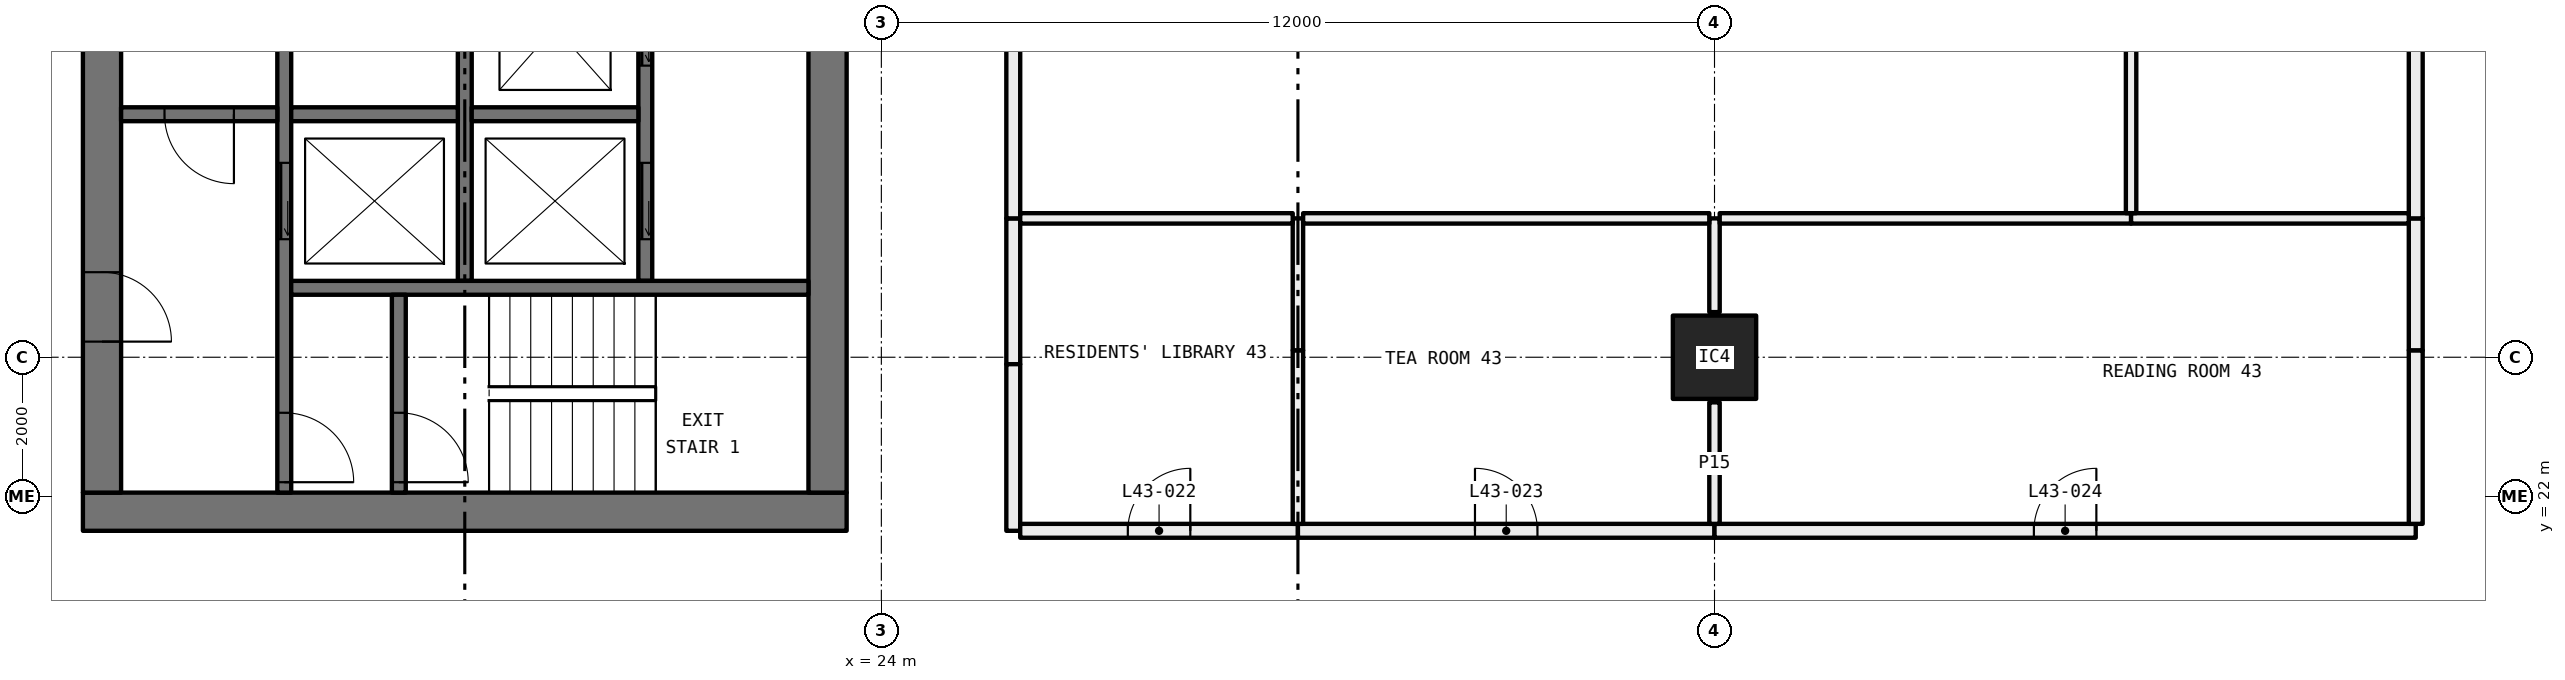
"""IFC4 building model, lengths in metres.
Left out: names, types, materials, properties, quantities, classifications, styles, units other than length and angle.
Written with IfcOpenShell. Run it as: python <this file> out.ifc"""

import sys

from ifc_helpers import new_model, si_unit, direction, frame, frame_2d, origin, origin_2d, place, context, subcontext, project, spatial, rectangle, hollow_rectangle, extrude, element, fill, save


model = new_model("IFC4")
c1 = context("Model", 3, precision=1e-05, world=origin(), true_north=direction((0.0, 1.0)))
c2 = subcontext(c1, "Body", "Model", "MODEL_VIEW")
j1 = project(units=[si_unit("LENGTHUNIT", "METRE"), si_unit("PLANEANGLEUNIT", "RADIAN")], contexts=[c1])
p1 = place(None, origin())
s1 = spatial("IfcSite", under=j1, at=p1, CompositionType="ELEMENT")
p2 = place(p1, origin())
s2 = spatial("IfcBuilding", under=s1, at=p2, CompositionType="ELEMENT")
p3 = place(p2, frame((0.0, 0.0, 165.15)))
s3 = spatial("IfcBuildingStorey", under=s2, at=p3, CompositionType="ELEMENT", Elevation=165.15)
p4 = place(p3, frame((36.0, 24.0, 0.0), z_axis=(0.0, 0.0, 1.0), x_axis=(1.0, 0.0, 0.0)))
e1 = element("IfcColumn", 1, at=p4, inside=s3, PredefinedType="COLUMN", context=c2, shape_type="SweptSolid", body=[
    extrude(hollow_rectangle(XDim=1.2, YDim=1.2, WallThickness=0.05, at=origin_2d()), origin(), (0.0, 0.0, 1.0), 3.05),
])
p5 = place(p3, frame((25.9, 26.0, 0.0), z_axis=(0.0, 0.0, 1.0), x_axis=(0.0, -1.0, 0.0)))
e2 = element("IfcWall", 2, at=p5, inside=s3, PredefinedType="PARTITIONING", context=c2, shape_type="SweptSolid", body=[
    extrude(rectangle(XDim=2.1, YDim=0.2, at=frame_2d((1.05, 0.0))), origin(), (0.0, 0.0, 1.0), 2.45),
])
p6 = place(p3, frame((25.9, 23.9, 0.0), z_axis=(0.0, 0.0, 1.0), x_axis=(0.0, -1.0, 0.0)))
e3 = element("IfcWall", 3, at=p6, inside=s3, PredefinedType="PARTITIONING", context=c2, shape_type="SweptSolid", body=[
    extrude(rectangle(XDim=2.4, YDim=0.2, at=frame_2d((1.2, 0.0))), origin(), (0.0, 0.0, 1.0), 3.05),
])
p7 = place(p3, frame((26.0, 21.5, 0.0), z_axis=(0.0, 0.0, 1.0), x_axis=(1.0, 0.0, 0.0)))
e4 = element("IfcWall", 4, at=p7, inside=s3, PredefinedType="PARTITIONING", context=c2, shape_type="SweptSolid", body=[
    extrude(rectangle(XDim=4.0, YDim=0.2, at=frame_2d((2.0, 0.0))), origin(), (0.0, 0.0, 1.0), 3.05),
])
p8 = place(p7, frame((1.55, 0.0, 0.0)))
e5 = element("IfcOpeningElement", 5, at=p8, cuts=e4, PredefinedType="OPENING", context=c2, shape_type="SweptSolid", body=[
    extrude(rectangle(XDim=0.9, YDim=2.1, at=frame_2d((0.45, 1.05))), frame((0.0, 0.11, 0.0), z_axis=(0.0, -1.0, 0.0), x_axis=(1.0, 0.0, 0.0)), (0.0, 0.0, 1.0), 0.22),
])
p9 = place(p3, frame((30.0, 21.5, 0.0), z_axis=(0.0, 0.0, 1.0), x_axis=(1.0, 0.0, 0.0)))
e6 = element("IfcWall", 6, at=p9, inside=s3, PredefinedType="PARTITIONING", context=c2, shape_type="SweptSolid", body=[
    extrude(rectangle(XDim=6.0, YDim=0.2, at=frame_2d((3.0, 0.0))), origin(), (0.0, 0.0, 1.0), 2.45),
])
p10 = place(p9, frame((2.55, 0.0, 0.0)))
e7 = element("IfcOpeningElement", 7, at=p10, cuts=e6, PredefinedType="OPENING", context=c2, shape_type="SweptSolid", body=[
    extrude(rectangle(XDim=0.9, YDim=2.1, at=frame_2d((0.45, 1.05))), frame((0.0, 0.11, 0.0), z_axis=(0.0, -1.0, 0.0), x_axis=(1.0, 0.0, 0.0)), (0.0, 0.0, 1.0), 0.22),
])
p11 = place(p3, frame((36.0, 21.5, 0.0), z_axis=(0.0, 0.0, 1.0), x_axis=(1.0, 0.0, 0.0)))
e8 = element("IfcWall", 8, at=p11, inside=s3, PredefinedType="PARTITIONING", context=c2, shape_type="SweptSolid", body=[
    extrude(rectangle(XDim=10.1, YDim=0.2, at=frame_2d((5.05, 0.0))), origin(), (0.0, 0.0, 1.0), 2.45),
])
p12 = place(p11, frame((4.6, 0.0, 0.0)))
e9 = element("IfcOpeningElement", 9, at=p12, cuts=e8, PredefinedType="OPENING", context=c2, shape_type="SweptSolid", body=[
    extrude(rectangle(XDim=0.9, YDim=2.1, at=frame_2d((0.45, 1.05))), frame((0.0, 0.11, 0.0), z_axis=(0.0, -1.0, 0.0), x_axis=(1.0, 0.0, 0.0)), (0.0, 0.0, 1.0), 0.22),
])
p13 = place(p3, frame((46.1, 21.6, 0.0), z_axis=(0.0, 0.0, 1.0), x_axis=(0.0, 1.0, 0.0)))
e10 = element("IfcWall", 10, at=p13, inside=s3, PredefinedType="PARTITIONING", context=c2, shape_type="SweptSolid", body=[
    extrude(rectangle(XDim=2.5, YDim=0.2, at=frame_2d((1.25, 0.0))), origin(), (0.0, 0.0, 1.0), 2.45),
])
p14 = place(p3, frame((46.1, 24.1, 0.0), z_axis=(0.0, 0.0, 1.0), x_axis=(0.0, 1.0, 0.0)))
e11 = element("IfcWall", 11, at=p14, inside=s3, PredefinedType="PARTITIONING", context=c2, shape_type="SweptSolid", body=[
    extrude(rectangle(XDim=1.9, YDim=0.2, at=frame_2d((0.95, 0.0))), origin(), (0.0, 0.0, 1.0), 3.05),
])
p15 = place(p3, frame((25.9, 35.9, 0.0), z_axis=(0.0, 0.0, 1.0), x_axis=(0.0, -1.0, 0.0)))
e12 = element("IfcWall", 12, at=p15, inside=s3, PredefinedType="PARTITIONING", context=c2, shape_type="SweptSolid", body=[
    extrude(rectangle(XDim=9.9, YDim=0.2, at=frame_2d((4.95, 0.0))), origin(), (0.0, 0.0, 1.0), 3.05),
])
p16 = place(p3, frame((46.1, 26.0, 0.0), z_axis=(0.0, 0.0, 1.0), x_axis=(0.0, 1.0, 0.0)))
e13 = element("IfcWall", 13, at=p16, inside=s3, PredefinedType="PARTITIONING", context=c2, shape_type="SweptSolid", body=[
    extrude(rectangle(XDim=10.1, YDim=0.2, at=frame_2d((5.05, 0.0))), origin(), (0.0, 0.0, 1.0), 2.45),
])
p17 = place(p16, frame((4.6, 0.0, 0.0)))
e14 = element("IfcOpeningElement", 14, at=p17, cuts=e13, PredefinedType="OPENING", context=c2, shape_type="SweptSolid", body=[
    extrude(rectangle(XDim=0.9, YDim=2.1, at=frame_2d((0.45, 1.05))), frame((0.0, 0.11, 0.0), z_axis=(0.0, -1.0, 0.0), x_axis=(1.0, 0.0, 0.0)), (0.0, 0.0, 1.0), 0.22),
])
p18 = place(p3, frame((30.0, 21.6, 0.0), z_axis=(0.0, 0.0, 1.0), x_axis=(0.0, 1.0, 0.0)))
e15 = element("IfcWall", 15, at=p18, inside=s3, PredefinedType="PARTITIONING", context=c2, shape_type="SweptSolid", body=[
    extrude(rectangle(XDim=2.5, YDim=0.15, at=frame_2d((1.25, 0.0))), origin(), (0.0, 0.0, 1.0), 2.45),
])
p19 = place(p3, frame((30.0, 24.1, 0.0), z_axis=(0.0, 0.0, 1.0), x_axis=(0.0, 1.0, 0.0)))
e16 = element("IfcWall", 16, at=p19, inside=s3, PredefinedType="PARTITIONING", context=c2, shape_type="SweptSolid", body=[
    extrude(rectangle(XDim=1.9, YDim=0.15, at=frame_2d((0.95, 0.0))), origin(), (0.0, 0.0, 1.0), 3.05),
])
p20 = place(p3, frame((29.925, 26.0, 0.0), z_axis=(0.0, 0.0, 1.0), x_axis=(-1.0, 0.0, 0.0)))
e17 = element("IfcWall", 17, at=p20, inside=s3, PredefinedType="PARTITIONING", context=c2, shape_type="SweptSolid", body=[
    extrude(rectangle(XDim=3.925, YDim=0.15, at=frame_2d((1.962, 0.0))), origin(), (0.0, 0.0, 1.0), 3.05),
])
p21 = place(p3, frame((36.0, 21.6, 0.0), z_axis=(0.0, 0.0, 1.0), x_axis=(0.0, 1.0, 0.0)))
e18 = element("IfcWall", 18, at=p21, inside=s3, PredefinedType="PARTITIONING", context=c2, shape_type="SweptSolid", body=[
    extrude(rectangle(XDim=1.75, YDim=0.15, at=frame_2d((0.875, 0.0))), origin(), (0.0, 0.0, 1.0), 2.45),
])
p22 = place(p3, frame((36.0, 24.65, 0.0), z_axis=(0.0, 0.0, 1.0), x_axis=(0.0, 1.0, 0.0)))
e19 = element("IfcWall", 19, at=p22, inside=s3, PredefinedType="PARTITIONING", context=c2, shape_type="SweptSolid", body=[
    extrude(rectangle(XDim=1.35, YDim=0.15, at=frame_2d((0.675, 0.0))), origin(), (0.0, 0.0, 1.0), 2.45),
])
p23 = place(p3, frame((35.925, 26.0, 0.0), z_axis=(0.0, 0.0, 1.0), x_axis=(-1.0, 0.0, 0.0)))
e20 = element("IfcWall", 20, at=p23, inside=s3, PredefinedType="PARTITIONING", context=c2, shape_type="SweptSolid", body=[
    extrude(rectangle(XDim=5.85, YDim=0.15, at=frame_2d((2.925, 0.0))), origin(), (0.0, 0.0, 1.0), 2.45),
])
p24 = place(p3, frame((42.0, 26.0, 0.0), z_axis=(0.0, 0.0, 1.0), x_axis=(-1.0, 0.0, 0.0)))
e21 = element("IfcWall", 21, at=p24, inside=s3, PredefinedType="PARTITIONING", context=c2, shape_type="SweptSolid", body=[
    extrude(rectangle(XDim=5.925, YDim=0.15, at=frame_2d((2.962, 0.0))), origin(), (0.0, 0.0, 1.0), 2.45),
])
p25 = place(p3, frame((46.0, 26.0, 0.0), z_axis=(0.0, 0.0, 1.0), x_axis=(-1.0, 0.0, 0.0)))
e22 = element("IfcWall", 22, at=p25, inside=s3, PredefinedType="PARTITIONING", context=c2, shape_type="SweptSolid", body=[
    extrude(rectangle(XDim=4.0, YDim=0.15, at=frame_2d((2.0, 0.0))), origin(), (0.0, 0.0, 1.0), 3.05),
])
p26 = place(p3, frame((42.0, 26.075, 0.0), z_axis=(0.0, 0.0, 1.0), x_axis=(0.0, 1.0, 0.0)))
e23 = element("IfcWall", 23, at=p26, inside=s3, PredefinedType="PARTITIONING", context=c2, shape_type="SweptSolid", body=[
    extrude(rectangle(XDim=10.025, YDim=0.15, at=frame_2d((5.013, 0.0))), origin(), (0.0, 0.0, 1.0), 2.45),
])
p27 = place(p3, frame((12.5, 21.775, 0.0), z_axis=(0.0, 0.0, 1.0), x_axis=(1.0, 0.0, 0.0)))
e24 = element("IfcWall", 24, at=p27, inside=s3, PredefinedType="SHEAR", context=c2, shape_type="SweptSolid", body=[
    extrude(rectangle(XDim=11.0, YDim=0.55, at=frame_2d((5.5, 0.0))), origin(), (0.0, 0.0, 1.0), 3.05),
])
p28 = place(p3, frame((12.775, 22.05, 0.0), z_axis=(0.0, 0.0, 1.0), x_axis=(0.0, 1.0, 0.0)))
e25 = element("IfcWall", 25, at=p28, inside=s3, PredefinedType="SHEAR", context=c2, shape_type="SweptSolid", body=[
    extrude(rectangle(XDim=15.9, YDim=0.55, at=frame_2d((7.95, 0.0))), origin(), (0.0, 0.0, 1.0), 3.05),
])
p29 = place(p28, frame((8.4, 0.0, 0.0)))
e26 = element("IfcOpeningElement", 26, at=p29, cuts=e25, PredefinedType="OPENING", context=c2, shape_type="SweptSolid", body=[
    extrude(rectangle(XDim=1.6, YDim=2.1, at=frame_2d((0.8, 1.05))), frame((0.0, 0.285, 0.0), z_axis=(0.0, -1.0, 0.0), x_axis=(1.0, 0.0, 0.0)), (0.0, 0.0, 1.0), 0.57),
])
p30 = place(p28, frame((2.175, 0.0, 0.0)))
e27 = element("IfcOpeningElement", 27, at=p30, cuts=e25, PredefinedType="OPENING", context=c2, shape_type="SweptSolid", body=[
    extrude(rectangle(XDim=1.0, YDim=2.1, at=frame_2d((0.5, 1.05))), frame((0.0, 0.285, 0.0), z_axis=(0.0, -1.0, 0.0), x_axis=(1.0, 0.0, 0.0)), (0.0, 0.0, 1.0), 0.57),
])
p31 = place(p3, frame((23.225, 22.05, 0.0), z_axis=(0.0, 0.0, 1.0), x_axis=(0.0, 1.0, 0.0)))
e28 = element("IfcWall", 28, at=p31, inside=s3, PredefinedType="SHEAR", context=c2, shape_type="SweptSolid", body=[
    extrude(rectangle(XDim=15.9, YDim=0.55, at=frame_2d((7.95, 0.0))), origin(), (0.0, 0.0, 1.0), 3.05),
])
p32 = place(p31, frame((7.15, 0.0, 0.0)))
e29 = element("IfcOpeningElement", 29, at=p32, cuts=e28, PredefinedType="OPENING", context=c2, shape_type="SweptSolid", body=[
    extrude(rectangle(XDim=1.6, YDim=2.1, at=frame_2d((0.8, 1.05))), frame((0.0, 0.285, 0.0), z_axis=(0.0, -1.0, 0.0), x_axis=(1.0, 0.0, 0.0)), (0.0, 0.0, 1.0), 0.57),
])
p33 = place(p3, frame((15.4, 22.05, 0.0), z_axis=(0.0, 0.0, 1.0), x_axis=(0.0, 1.0, 0.0)))
e30 = element("IfcWall", 30, at=p33, inside=s3, PredefinedType="SOLIDWALL", context=c2, shape_type="SweptSolid", body=[
    extrude(rectangle(XDim=12.85, YDim=0.2, at=frame_2d((6.425, 0.0))), origin(), (0.0, 0.0, 1.0), 3.05),
])
p34 = place(p33, frame((3.65, 0.0, 0.0)))
e31 = element("IfcOpeningElement", 31, at=p34, cuts=e30, PredefinedType="OPENING", context=c2, shape_type="SweptSolid", body=[
    extrude(rectangle(XDim=1.1, YDim=2.1, at=frame_2d((0.55, 1.05))), frame((0.0, 0.11, 0.0), z_axis=(0.0, -1.0, 0.0), x_axis=(1.0, 0.0, 0.0)), (0.0, 0.0, 1.0), 0.22),
])
p35 = place(p33, frame((0.15, 0.0, 0.0)))
e32 = element("IfcOpeningElement", 32, at=p35, cuts=e30, PredefinedType="OPENING", context=c2, shape_type="SweptSolid", body=[
    extrude(rectangle(XDim=1.0, YDim=2.1, at=frame_2d((0.5, 1.05))), frame((0.0, 0.11, 0.0), z_axis=(0.0, -1.0, 0.0), x_axis=(1.0, 0.0, 0.0)), (0.0, 0.0, 1.0), 0.22),
])
p36 = place(p33, frame((8.75, 0.0, 0.0)))
e33 = element("IfcOpeningElement", 33, at=p36, cuts=e30, PredefinedType="OPENING", context=c2, shape_type="SweptSolid", body=[
    extrude(rectangle(XDim=0.9, YDim=2.1, at=frame_2d((0.45, 1.05))), frame((0.0, 0.11, 0.0), z_axis=(0.0, -1.0, 0.0), x_axis=(1.0, 0.0, 0.0)), (0.0, 0.0, 1.0), 0.22),
])
p37 = place(p3, frame((20.6, 25.1, 0.0), z_axis=(0.0, 0.0, 1.0), x_axis=(0.0, 1.0, 0.0)))
e34 = element("IfcWall", 34, at=p37, inside=s3, PredefinedType="SOLIDWALL", context=c2, shape_type="SweptSolid", body=[
    extrude(rectangle(XDim=12.85, YDim=0.2, at=frame_2d((6.425, 0.0))), origin(), (0.0, 0.0, 1.0), 3.05),
])
p38 = place(p37, frame((0.6, 0.0, 0.0)))
e35 = element("IfcOpeningElement", 35, at=p38, cuts=e34, PredefinedType="OPENING", context=c2, shape_type="SweptSolid", body=[
    extrude(rectangle(XDim=1.1, YDim=2.1, at=frame_2d((0.55, 1.05))), frame((0.0, 0.11, 0.0), z_axis=(0.0, -1.0, 0.0), x_axis=(1.0, 0.0, 0.0)), (0.0, 0.0, 1.0), 0.22),
])
p39 = place(p37, frame((3.1, 0.0, 0.0)))
e36 = element("IfcOpeningElement", 36, at=p39, cuts=e34, PredefinedType="OPENING", context=c2, shape_type="SweptSolid", body=[
    extrude(rectangle(XDim=1.1, YDim=2.1, at=frame_2d((0.55, 1.05))), frame((0.0, 0.11, 0.0), z_axis=(0.0, -1.0, 0.0), x_axis=(1.0, 0.0, 0.0)), (0.0, 0.0, 1.0), 0.22),
])
p40 = place(p37, frame((5.6, 0.0, 0.0)))
e37 = element("IfcOpeningElement", 37, at=p40, cuts=e34, PredefinedType="OPENING", context=c2, shape_type="SweptSolid", body=[
    extrude(rectangle(XDim=1.1, YDim=2.1, at=frame_2d((0.55, 1.05))), frame((0.0, 0.11, 0.0), z_axis=(0.0, -1.0, 0.0), x_axis=(1.0, 0.0, 0.0)), (0.0, 0.0, 1.0), 0.22),
])
p41 = place(p37, frame((8.1, 0.0, 0.0)))
e38 = element("IfcOpeningElement", 38, at=p41, cuts=e34, PredefinedType="OPENING", context=c2, shape_type="SweptSolid", body=[
    extrude(rectangle(XDim=1.1, YDim=2.1, at=frame_2d((0.55, 1.05))), frame((0.0, 0.11, 0.0), z_axis=(0.0, -1.0, 0.0), x_axis=(1.0, 0.0, 0.0)), (0.0, 0.0, 1.0), 0.22),
])
p42 = place(p37, frame((10.925, 0.0, 0.0)))
e39 = element("IfcOpeningElement", 39, at=p42, cuts=e34, PredefinedType="OPENING", context=c2, shape_type="SweptSolid", body=[
    extrude(rectangle(XDim=1.0, YDim=2.1, at=frame_2d((0.5, 1.05))), frame((0.0, 0.11, 0.0), z_axis=(0.0, -1.0, 0.0), x_axis=(1.0, 0.0, 0.0)), (0.0, 0.0, 1.0), 0.22),
])
p43 = place(p3, frame((18.0, 25.1, 0.0), z_axis=(0.0, 0.0, 1.0), x_axis=(0.0, 1.0, 0.0)))
e40 = element("IfcWall", 40, at=p43, inside=s3, PredefinedType="SOLIDWALL", context=c2, shape_type="SweptSolid", body=[
    extrude(rectangle(XDim=9.8, YDim=0.2, at=frame_2d((4.9, 0.0))), origin(), (0.0, 0.0, 1.0), 3.05),
])
p44 = place(p3, frame((15.5, 25.0, 0.0), z_axis=(0.0, 0.0, 1.0), x_axis=(1.0, 0.0, 0.0)))
e41 = element("IfcWall", 41, at=p44, inside=s3, PredefinedType="SOLIDWALL", context=c2, shape_type="SweptSolid", body=[
    extrude(rectangle(XDim=7.45, YDim=0.2, at=frame_2d((3.725, 0.0))), origin(), (0.0, 0.0, 1.0), 3.05),
])
p45 = place(p3, frame((13.05, 27.5, 0.0), z_axis=(0.0, 0.0, 1.0), x_axis=(1.0, 0.0, 0.0)))
e42 = element("IfcWall", 42, at=p45, inside=s3, PredefinedType="SOLIDWALL", context=c2, shape_type="SweptSolid", body=[
    extrude(rectangle(XDim=2.25, YDim=0.2, at=frame_2d((1.125, 0.0))), origin(), (0.0, 0.0, 1.0), 3.05),
])
p46 = place(p45, frame((0.625, 0.0, 0.0)))
e43 = element("IfcOpeningElement", 43, at=p46, cuts=e42, PredefinedType="OPENING", context=c2, shape_type="SweptSolid", body=[
    extrude(rectangle(XDim=1.0, YDim=2.1, at=frame_2d((0.5, 1.05))), frame((0.0, 0.11, 0.0), z_axis=(0.0, -1.0, 0.0), x_axis=(1.0, 0.0, 0.0)), (0.0, 0.0, 1.0), 0.22),
])
p47 = place(p3, frame((17.05, 22.05, 0.0), z_axis=(0.0, 0.0, 1.0), x_axis=(0.0, 1.0, 0.0)))
e44 = element("IfcWall", 44, at=p47, inside=s3, PredefinedType="SOLIDWALL", context=c2, shape_type="SweptSolid", body=[
    extrude(rectangle(XDim=2.85, YDim=0.2, at=frame_2d((1.425, 0.0))), origin(), (0.0, 0.0, 1.0), 3.05),
])
p48 = place(p47, frame((0.15, 0.0, 0.0)))
e45 = element("IfcOpeningElement", 45, at=p48, cuts=e44, PredefinedType="OPENING", context=c2, shape_type="SweptSolid", body=[
    extrude(rectangle(XDim=1.0, YDim=2.1, at=frame_2d((0.5, 1.05))), frame((0.0, 0.11, 0.0), z_axis=(0.0, -1.0, 0.0), x_axis=(1.0, 0.0, 0.0)), (0.0, 0.0, 1.0), 0.22),
])
for number, where, z_axis, x_axis in (
    (46, (15.5, 27.5, 0.0), (0.0, 0.0, 1.0), (1.0, 0.0, 0.0)),
    (47, (18.1, 27.5, 0.0), (0.0, 0.0, 1.0), (1.0, 0.0, 0.0)),
):
    element("IfcWall", number, at=place(p3, frame(where, z_axis=z_axis, x_axis=x_axis)), inside=s3, PredefinedType="SOLIDWALL", context=c2, shape_type="SweptSolid", body=[
        extrude(rectangle(XDim=2.4, YDim=0.2, at=frame_2d((1.2, 0.0))), origin(), (0.0, 0.0, 1.0), 3.05),
    ])
p49 = place(p8, origin())
e48 = element("IfcDoor", 48, at=p49, inside=s3, OperationType="SINGLE_SWING_LEFT", PredefinedType="DOOR", context=c2, shape_type="SweptSolid", body=[
    extrude(rectangle(XDim=0.9, YDim=2.1, at=frame_2d((0.45, 1.05))), frame((0.0, 0.025, 0.0), z_axis=(0.0, -1.0, 0.0), x_axis=(1.0, 0.0, 0.0)), (0.0, 0.0, 1.0), 0.05),
])
fill(e5, e48)
p50 = place(p10, origin())
e49 = element("IfcDoor", 49, at=p50, inside=s3, OperationType="SINGLE_SWING_RIGHT", PredefinedType="DOOR", context=c2, shape_type="SweptSolid", body=[
    extrude(rectangle(XDim=0.9, YDim=2.1, at=frame_2d((0.45, 1.05))), frame((0.0, 0.025, 0.0), z_axis=(0.0, -1.0, 0.0), x_axis=(1.0, 0.0, 0.0)), (0.0, 0.0, 1.0), 0.05),
])
fill(e7, e49)
p51 = place(p12, origin())
e50 = element("IfcDoor", 50, at=p51, inside=s3, OperationType="SINGLE_SWING_LEFT", PredefinedType="DOOR", context=c2, shape_type="SweptSolid", body=[
    extrude(rectangle(XDim=0.9, YDim=2.1, at=frame_2d((0.45, 1.05))), frame((0.0, 0.025, 0.0), z_axis=(0.0, -1.0, 0.0), x_axis=(1.0, 0.0, 0.0)), (0.0, 0.0, 1.0), 0.05),
])
fill(e9, e50)
p52 = place(p38, origin())
e51 = element("IfcDoor", 51, at=p52, inside=s3, OperationType="SLIDING_TO_LEFT", PredefinedType="DOOR", context=c2, shape_type="SweptSolid", body=[
    extrude(rectangle(XDim=1.1, YDim=2.1, at=frame_2d((0.55, 1.05))), frame((0.0, 0.025, 0.0), z_axis=(0.0, -1.0, 0.0), x_axis=(1.0, 0.0, 0.0)), (0.0, 0.0, 1.0), 0.05),
])
fill(e35, e51)
p53 = place(p39, origin())
e52 = element("IfcDoor", 52, at=p53, inside=s3, OperationType="SLIDING_TO_LEFT", PredefinedType="DOOR", context=c2, shape_type="SweptSolid", body=[
    extrude(rectangle(XDim=1.1, YDim=2.1, at=frame_2d((0.55, 1.05))), frame((0.0, 0.025, 0.0), z_axis=(0.0, -1.0, 0.0), x_axis=(1.0, 0.0, 0.0)), (0.0, 0.0, 1.0), 0.05),
])
fill(e36, e52)
p54 = place(p34, origin())
e53 = element("IfcDoor", 53, at=p54, inside=s3, OperationType="SLIDING_TO_LEFT", PredefinedType="DOOR", context=c2, shape_type="SweptSolid", body=[
    extrude(rectangle(XDim=1.1, YDim=2.1, at=frame_2d((0.55, 1.05))), frame((0.0, 0.025, 0.0), z_axis=(0.0, -1.0, 0.0), x_axis=(1.0, 0.0, 0.0)), (0.0, 0.0, 1.0), 0.05),
])
fill(e31, e53)
p55 = place(p48, frame((1.0, 0.0, 0.0), x_axis=(-1.0, 0.0, 0.0)))
e54 = element("IfcDoor", 54, at=p55, inside=s3, OperationType="SINGLE_SWING_LEFT", PredefinedType="DOOR", context=c2, shape_type="SweptSolid", body=[
    extrude(rectangle(XDim=1.0, YDim=2.1, at=frame_2d((0.5, 1.05))), frame((0.0, 0.025, 0.0), z_axis=(0.0, -1.0, 0.0), x_axis=(1.0, 0.0, 0.0)), (0.0, 0.0, 1.0), 0.05),
])
fill(e45, e54)
p56 = place(p35, frame((1.0, 0.0, 0.0), x_axis=(-1.0, 0.0, 0.0)))
e55 = element("IfcDoor", 55, at=p56, inside=s3, OperationType="SINGLE_SWING_LEFT", PredefinedType="DOOR", context=c2, shape_type="SweptSolid", body=[
    extrude(rectangle(XDim=1.0, YDim=2.1, at=frame_2d((0.5, 1.05))), frame((0.0, 0.025, 0.0), z_axis=(0.0, -1.0, 0.0), x_axis=(1.0, 0.0, 0.0)), (0.0, 0.0, 1.0), 0.05),
])
fill(e32, e55)
p57 = place(p46, frame((1.0, 0.0, 0.0), x_axis=(-1.0, 0.0, 0.0)))
e56 = element("IfcDoor", 56, at=p57, inside=s3, OperationType="SINGLE_SWING_RIGHT", PredefinedType="DOOR", context=c2, shape_type="SweptSolid", body=[
    extrude(rectangle(XDim=1.0, YDim=2.1, at=frame_2d((0.5, 1.05))), frame((0.0, 0.025, 0.0), z_axis=(0.0, -1.0, 0.0), x_axis=(1.0, 0.0, 0.0)), (0.0, 0.0, 1.0), 0.05),
])
fill(e43, e56)
p58 = place(p30, frame((1.0, 0.0, 0.0), x_axis=(-1.0, 0.0, 0.0)))
e57 = element("IfcDoor", 57, at=p58, inside=s3, OperationType="SINGLE_SWING_LEFT", PredefinedType="DOOR", context=c2, shape_type="SweptSolid", body=[
    extrude(rectangle(XDim=1.0, YDim=2.1, at=frame_2d((0.5, 1.05))), frame((0.0, 0.025, 0.0), z_axis=(0.0, -1.0, 0.0), x_axis=(1.0, 0.0, 0.0)), (0.0, 0.0, 1.0), 0.05),
])
fill(e27, e57)
save(model, sys.argv[1])
